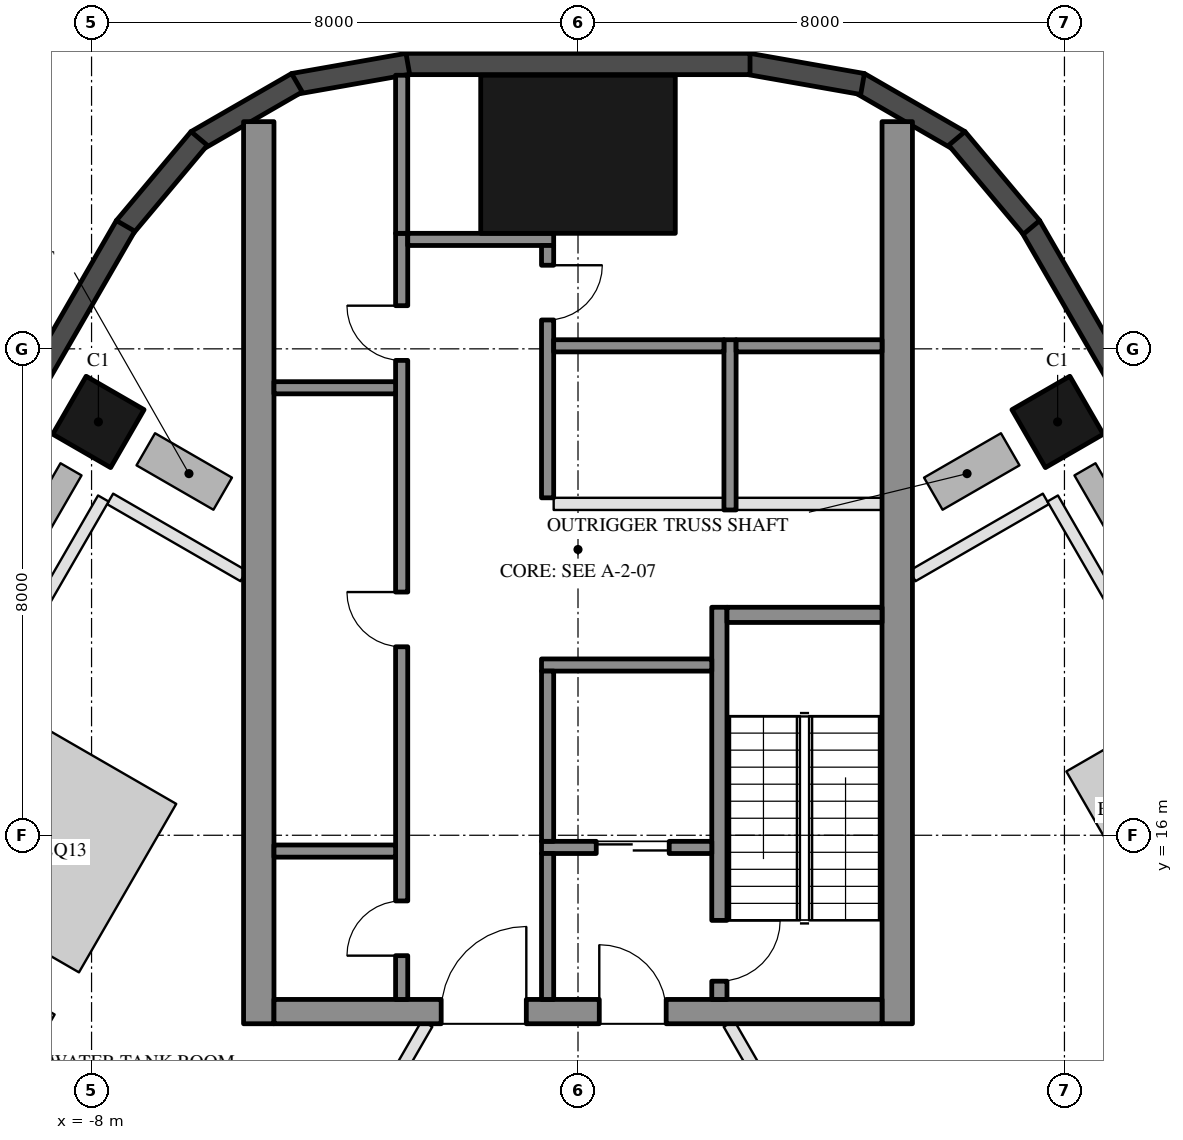
"""IFC4 building model, lengths in metres.
Left out: names, types, materials, properties, quantities, classifications, styles, units other than length and angle.
Written with IfcOpenShell. Run it as: python <this file> out.ifc"""

import sys

from ifc_helpers import new_model, si_unit, direction, frame, frame_2d, origin, origin_2d, place, context, subcontext, project, spatial, rectangle, hollow_rectangle, extrude, boolean, halfspace, element, fill, save


model = new_model("IFC4")
c1 = context("Model", 3, precision=1e-05, world=origin(), true_north=direction((0.0, 1.0)))
c2 = subcontext(c1, "Body", "Model", "MODEL_VIEW")
j1 = project(units=[si_unit("LENGTHUNIT", "METRE"), si_unit("PLANEANGLEUNIT", "RADIAN")], contexts=[c1])
p1 = place(None, origin())
s1 = spatial("IfcSite", under=j1, at=p1, CompositionType="ELEMENT")
p2 = place(p1, origin())
s2 = spatial("IfcBuilding", under=s1, at=p2, CompositionType="ELEMENT")
p3 = place(p2, frame((0.0, 0.0, 37.5)))
s3 = spatial("IfcBuildingStorey", under=s2, at=p3, CompositionType="ELEMENT", Elevation=37.5)
for number, where, z_axis, x_axis in (
    (1, (7.888, 22.798, 0.0), (0.0, 0.0, 1.0), (-0.5, 0.866, 0.0)),
    (2, (-7.888, 22.798, 0.0), (0.0, 0.0, 1.0), (0.5, 0.866, 0.0)),
):
    element("IfcColumn", number, at=place(p3, frame(where, z_axis=z_axis, x_axis=x_axis)), inside=s3, PredefinedType="COLUMN", context=c2, shape_type="SweptSolid", body=[
        boolean("DIFFERENCE", extrude(hollow_rectangle(XDim=1.1, YDim=1.1, WallThickness=0.05, at=origin_2d()), origin(), (0.0, 0.0, 1.0), 4.5), halfspace(frame((0.0, 0.0, 0.007), z_axis=(0.0, 0.0, 1.0), x_axis=(1.0, 0.0, 0.0)), True)),
    ])
p4 = place(p3, frame((0.0, 27.2, 0.0), z_axis=(0.0, 0.0, 1.0), x_axis=(1.0, 0.0, 0.0)))
e3 = element("IfcColumn", 3, at=p4, inside=s3, PredefinedType="COLUMN", context=c2, shape_type="SweptSolid", body=[
    extrude(hollow_rectangle(XDim=3.2, YDim=2.6, WallThickness=0.08, at=origin_2d()), origin(), (0.0, 0.0, 1.0), 4.5),
])
for number, where, z_axis, x_axis in (
    (4, (6.277, 27.422, 0.0), (0.0, 0.0, 1.0), (-0.866, 0.5, 0.0)),
    (5, (4.68, 28.356, 0.0), (0.0, 0.0, 1.0), (-0.985, 0.174, 0.0)),
):
    element("IfcWall", number, at=place(p3, frame(where, z_axis=z_axis, x_axis=x_axis)), inside=s3, PredefinedType="SOLIDWALL", context=c2, shape_type="SweptSolid", body=[
        extrude(rectangle(XDim=1.91, YDim=0.35, at=frame_2d((0.955, 0.0))), origin(), (0.0, 0.0, 1.0), 4.2),
    ])
p5 = place(p3, frame((2.829, 28.685, 0.0), z_axis=(0.0, 0.0, 1.0), x_axis=(-1.0, 0.0, 0.0)))
e6 = element("IfcWall", 6, at=p5, inside=s3, PredefinedType="SOLIDWALL", context=c2, shape_type="SweptSolid", body=[
    extrude(rectangle(XDim=5.658, YDim=0.35, at=frame_2d((2.829, 0.0))), origin(), (0.0, 0.0, 1.0), 4.2),
])
for number, where, z_axis, x_axis in (
    (7, (-2.799, 28.688, 0.0), (0.0, 0.0, 1.0), (-0.985, -0.174, 0.0)),
    (8, (-4.623, 28.377, 0.0), (0.0, 0.0, 1.0), (-0.866, -0.5, 0.0)),
):
    element("IfcWall", number, at=place(p3, frame(where, z_axis=z_axis, x_axis=x_axis)), inside=s3, PredefinedType="SOLIDWALL", context=c2, shape_type="SweptSolid", body=[
        extrude(rectangle(XDim=1.91, YDim=0.35, at=frame_2d((0.955, 0.0))), origin(), (0.0, 0.0, 1.0), 4.2),
    ])
p6 = place(p3, frame((-6.23, 27.461, 0.0), z_axis=(0.0, 0.0, 1.0), x_axis=(-0.642808304945, -0.766027077259, 0.0)))
e9 = element("IfcWall", 9, at=p6, inside=s3, PredefinedType="SOLIDWALL", context=c2, shape_type="SweptSolid", body=[
    extrude(rectangle(XDim=1.91, YDim=0.35, at=frame_2d((0.955, 0.0))), origin(), (0.0, 0.0, 1.0), 4.2),
])
for number, where, z_axis, x_axis in (
    (10, (-7.441, 26.022, 0.0), (0.0, 0.0, 1.0), (-0.5, -0.866, 0.0)),
    (11, (26.256, -6.567, 0.0), (0.0, 0.0, 1.0), (-0.5, 0.866, 0.0)),
):
    element("IfcWall", number, at=place(p3, frame(where, z_axis=z_axis, x_axis=x_axis)), inside=s3, PredefinedType="SOLIDWALL", context=c2, shape_type="SweptSolid", body=[
        extrude(rectangle(XDim=37.631, YDim=0.35, at=frame_2d((18.816, 0.0))), origin(), (0.0, 0.0, 1.0), 4.2),
    ])
p7 = place(p3, frame((7.458, 25.998, 0.0), z_axis=(0.0, 0.0, 1.0), x_axis=(-0.642808304945, 0.766027077259, 0.0)))
e12 = element("IfcWall", 12, at=p7, inside=s3, PredefinedType="SOLIDWALL", context=c2, shape_type="SweptSolid", body=[
    extrude(rectangle(XDim=1.91, YDim=0.35, at=frame_2d((0.955, 0.0))), origin(), (0.0, 0.0, 1.0), 4.2),
])
for number, where, z_axis, x_axis in (
    (13, (5.25, 12.9, 0.0), (0.0, 0.0, 1.0), (0.0, 1.0, 0.0)),
    (14, (-5.25, 12.9, 0.0), (0.0, 0.0, 1.0), (0.0, 1.0, 0.0)),
):
    element("IfcWall", number, at=place(p3, frame(where, z_axis=z_axis, x_axis=x_axis)), inside=s3, PredefinedType="SHEAR", context=c2, shape_type="SweptSolid", body=[
        extrude(rectangle(XDim=14.837, YDim=0.5, at=frame_2d((7.418, 0.0))), origin(), (0.0, 0.0, 1.0), 4.2),
    ])
p8 = place(p3, frame((5.0, 13.1, 0.0), z_axis=(0.0, 0.0, 1.0), x_axis=(-1.0, 0.0, 0.0)))
e15 = element("IfcWall", 15, at=p8, inside=s3, PredefinedType="SHEAR", context=c2, shape_type="SweptSolid", body=[
    extrude(rectangle(XDim=10.0, YDim=0.4, at=frame_2d((5.0, 0.0))), origin(), (0.0, 0.0, 1.0), 4.2),
])
p9 = place(p8, frame((3.55, 0.0, 0.0)))
e16 = element("IfcOpeningElement", 16, at=p9, cuts=e15, PredefinedType="OPENING", context=c2, shape_type="SweptSolid", body=[
    extrude(rectangle(XDim=1.1, YDim=2.1, at=frame_2d((0.55, 1.05))), frame((0.0, 0.21, 0.0), z_axis=(0.0, -1.0, 0.0), x_axis=(1.0, 0.0, 0.0)), (0.0, 0.0, 1.0), 0.42),
])
p10 = place(p8, frame((5.85, 0.0, 0.0)))
e17 = element("IfcOpeningElement", 17, at=p10, cuts=e15, PredefinedType="OPENING", context=c2, shape_type="SweptSolid", body=[
    extrude(rectangle(XDim=1.4, YDim=2.1, at=frame_2d((0.7, 1.05))), frame((0.0, 0.21, 0.0), z_axis=(0.0, -1.0, 0.0), x_axis=(1.0, 0.0, 0.0)), (0.0, 0.0, 1.0), 0.42),
])
p11 = place(p3, frame((2.325, 13.3, 0.0), z_axis=(0.0, 0.0, 1.0), x_axis=(0.0, 1.0, 0.0)))
e18 = element("IfcWall", 18, at=p11, inside=s3, PredefinedType="SHEAR", context=c2, shape_type="SweptSolid", body=[
    extrude(rectangle(XDim=6.45, YDim=0.25, at=frame_2d((3.225, 0.0))), origin(), (0.0, 0.0, 1.0), 4.2),
])
p12 = place(p11, frame((0.3, 0.0, 0.0)))
e19 = element("IfcOpeningElement", 19, at=p12, cuts=e18, PredefinedType="OPENING", context=c2, shape_type="SweptSolid", body=[
    extrude(rectangle(XDim=1.0, YDim=2.1, at=frame_2d((0.5, 1.05))), frame((0.0, 0.135, 0.0), z_axis=(0.0, -1.0, 0.0), x_axis=(1.0, 0.0, 0.0)), (0.0, 0.0, 1.0), 0.27),
])
p13 = place(p3, frame((5.0, 19.625, 0.0), z_axis=(0.0, 0.0, 1.0), x_axis=(-1.0, 0.0, 0.0)))
e20 = element("IfcWall", 20, at=p13, inside=s3, PredefinedType="SHEAR", context=c2, shape_type="SweptSolid", body=[
    extrude(rectangle(XDim=2.55, YDim=0.25, at=frame_2d((1.275, 0.0))), origin(), (0.0, 0.0, 1.0), 4.2),
])
p14 = place(p3, frame((2.2, 18.8, 0.0), z_axis=(0.0, 0.0, 1.0), x_axis=(-1.0, 0.0, 0.0)))
e21 = element("IfcWall", 21, at=p14, inside=s3, PredefinedType="SHEAR", context=c2, shape_type="SweptSolid", body=[
    extrude(rectangle(XDim=2.8, YDim=0.2, at=frame_2d((1.4, 0.0))), origin(), (0.0, 0.0, 1.0), 4.2),
])
p15 = place(p3, frame((2.2, 15.8, 0.0), z_axis=(0.0, 0.0, 1.0), x_axis=(-1.0, 0.0, 0.0)))
e22 = element("IfcWall", 22, at=p15, inside=s3, PredefinedType="SHEAR", context=c2, shape_type="SweptSolid", body=[
    extrude(rectangle(XDim=2.8, YDim=0.2, at=frame_2d((1.4, 0.0))), origin(), (0.0, 0.0, 1.0), 4.2),
])
p16 = place(p15, frame((0.7, 0.0, 0.0)))
e23 = element("IfcOpeningElement", 23, at=p16, cuts=e22, PredefinedType="OPENING", context=c2, shape_type="SweptSolid", body=[
    extrude(rectangle(XDim=1.2, YDim=2.1, at=frame_2d((0.6, 1.05))), frame((0.0, 0.11, 0.0), z_axis=(0.0, -1.0, 0.0), x_axis=(1.0, 0.0, 0.0)), (0.0, 0.0, 1.0), 0.22),
])
p17 = place(p3, frame((-0.5, 15.9, 0.0), z_axis=(0.0, 0.0, 1.0), x_axis=(0.0, 1.0, 0.0)))
e24 = element("IfcWall", 24, at=p17, inside=s3, PredefinedType="SHEAR", context=c2, shape_type="SweptSolid", body=[
    extrude(rectangle(XDim=2.8, YDim=0.2, at=frame_2d((1.4, 0.0))), origin(), (0.0, 0.0, 1.0), 4.2),
])
p18 = place(p3, frame((-0.5, 13.3, 0.0), z_axis=(0.0, 0.0, 1.0), x_axis=(0.0, 1.0, 0.0)))
e25 = element("IfcWall", 25, at=p18, inside=s3, PredefinedType="SHEAR", context=c2, shape_type="SweptSolid", body=[
    extrude(rectangle(XDim=2.4, YDim=0.2, at=frame_2d((1.2, 0.0))), origin(), (0.0, 0.0, 1.0), 4.2),
])
p19 = place(p3, frame((-2.9, 13.3, 0.0), z_axis=(0.0, 0.0, 1.0), x_axis=(0.0, 1.0, 0.0)))
e26 = element("IfcWall", 26, at=p19, inside=s3, PredefinedType="SHEAR", context=c2, shape_type="SweptSolid", body=[
    extrude(rectangle(XDim=12.6, YDim=0.2, at=frame_2d((6.3, 0.0))), origin(), (0.0, 0.0, 1.0), 4.2),
])
p20 = place(p19, frame((0.72, 0.0, 0.0)))
e27 = element("IfcOpeningElement", 27, at=p20, cuts=e26, PredefinedType="OPENING", context=c2, shape_type="SweptSolid", body=[
    extrude(rectangle(XDim=0.9, YDim=2.1, at=frame_2d((0.45, 1.05))), frame((0.0, 0.11, 0.0), z_axis=(0.0, -1.0, 0.0), x_axis=(1.0, 0.0, 0.0)), (0.0, 0.0, 1.0), 0.22),
])
p21 = place(p19, frame((5.8, 0.0, 0.0)))
e28 = element("IfcOpeningElement", 28, at=p21, cuts=e26, PredefinedType="OPENING", context=c2, shape_type="SweptSolid", body=[
    extrude(rectangle(XDim=0.9, YDim=2.1, at=frame_2d((0.45, 1.05))), frame((0.0, 0.11, 0.0), z_axis=(0.0, -1.0, 0.0), x_axis=(1.0, 0.0, 0.0)), (0.0, 0.0, 1.0), 0.22),
])
p22 = place(p19, frame((10.51, 0.0, 0.0)))
e29 = element("IfcOpeningElement", 29, at=p22, cuts=e26, PredefinedType="OPENING", context=c2, shape_type="SweptSolid", body=[
    extrude(rectangle(XDim=0.9, YDim=2.1, at=frame_2d((0.45, 1.05))), frame((0.0, 0.11, 0.0), z_axis=(0.0, -1.0, 0.0), x_axis=(1.0, 0.0, 0.0)), (0.0, 0.0, 1.0), 0.22),
])
p23 = place(p3, frame((-0.4, 25.8, 0.0), z_axis=(0.0, 0.0, 1.0), x_axis=(-1.0, 0.0, 0.0)))
e30 = element("IfcWall", 30, at=p23, inside=s3, PredefinedType="SHEAR", context=c2, shape_type="SweptSolid", body=[
    extrude(rectangle(XDim=2.4, YDim=0.2, at=frame_2d((1.2, 0.0))), origin(), (0.0, 0.0, 1.0), 4.2),
])
p24 = place(p3, frame((-0.5, 21.55, 0.0), z_axis=(0.0, 0.0, 1.0), x_axis=(0.0, 1.0, 0.0)))
e31 = element("IfcWall", 31, at=p24, inside=s3, PredefinedType="SHEAR", context=c2, shape_type="SweptSolid", body=[
    extrude(rectangle(XDim=4.15, YDim=0.2, at=frame_2d((2.075, 0.0))), origin(), (0.0, 0.0, 1.0), 4.2),
])
p25 = place(p24, frame((2.925, 0.0, 0.0)))
e32 = element("IfcOpeningElement", 32, at=p25, cuts=e31, PredefinedType="OPENING", context=c2, shape_type="SweptSolid", body=[
    extrude(rectangle(XDim=0.9, YDim=2.1, at=frame_2d((0.45, 1.05))), frame((0.0, 0.11, 0.0), z_axis=(0.0, -1.0, 0.0), x_axis=(1.0, 0.0, 0.0)), (0.0, 0.0, 1.0), 0.22),
])
for number, where, z_axis, x_axis in (
    (33, (-3.0, 15.74, 0.0), (0.0, 0.0, 1.0), (-1.0, 0.0, 0.0)),
    (34, (-3.0, 23.36, 0.0), (0.0, 0.0, 1.0), (-1.0, 0.0, 0.0)),
):
    element("IfcWall", number, at=place(p3, frame(where, z_axis=z_axis, x_axis=x_axis)), inside=s3, PredefinedType="SHEAR", context=c2, shape_type="SweptSolid", body=[
        extrude(rectangle(XDim=2.0, YDim=0.2, at=frame_2d((1.0, 0.0))), origin(), (0.0, 0.0, 1.0), 4.2),
    ])
p26 = place(p3, frame((-2.9, 25.9, 0.0), z_axis=(0.0, 0.0, 1.0), x_axis=(0.0, 1.0, 0.0)))
e35 = element("IfcWall", 35, at=p26, inside=s3, PredefinedType="SHEAR", context=c2, shape_type="SweptSolid", body=[
    extrude(rectangle(XDim=2.6, YDim=0.2, at=frame_2d((1.3, 0.0))), origin(), (0.0, 0.0, 1.0), 4.2),
])
p27 = place(p3, frame((2.5, 21.35, 0.0), z_axis=(0.0, 0.0, 1.0), x_axis=(0.0, 1.0, 0.0)))
e36 = element("IfcWall", 36, at=p27, inside=s3, PredefinedType="SHEAR", context=c2, shape_type="SweptSolid", body=[
    extrude(rectangle(XDim=2.8, YDim=0.2, at=frame_2d((1.4, 0.0))), origin(), (0.0, 0.0, 1.0), 4.2),
])
p28 = place(p3, frame((5.0, 24.05, 0.0), z_axis=(0.0, 0.0, 1.0), x_axis=(-1.0, 0.0, 0.0)))
e37 = element("IfcWall", 37, at=p28, inside=s3, PredefinedType="SHEAR", context=c2, shape_type="SweptSolid", body=[
    extrude(rectangle(XDim=2.4, YDim=0.2, at=frame_2d((1.2, 0.0))), origin(), (0.0, 0.0, 1.0), 4.2),
])
p29 = place(p3, frame((2.4, 24.05, 0.0), z_axis=(0.0, 0.0, 1.0), x_axis=(-1.0, 0.0, 0.0)))
e38 = element("IfcWall", 38, at=p29, inside=s3, PredefinedType="SHEAR", context=c2, shape_type="SweptSolid", body=[
    extrude(rectangle(XDim=2.8, YDim=0.2, at=frame_2d((1.4, 0.0))), origin(), (0.0, 0.0, 1.0), 4.2),
])
p30 = place(p3, frame((5.0, 21.45, 0.0), z_axis=(0.0, 0.0, 1.0), x_axis=(-1.0, 0.0, 0.0)))
e39 = element("IfcWall", 39, at=p30, inside=s3, PredefinedType="PARTITIONING", context=c2, shape_type="SweptSolid", body=[
    extrude(rectangle(XDim=2.4, YDim=0.2, at=frame_2d((1.2, 0.0))), origin(), (0.0, 0.0, 1.0), 4.2),
])
p31 = place(p3, frame((2.4, 21.45, 0.0), z_axis=(0.0, 0.0, 1.0), x_axis=(-1.0, 0.0, 0.0)))
e40 = element("IfcWall", 40, at=p31, inside=s3, PredefinedType="PARTITIONING", context=c2, shape_type="SweptSolid", body=[
    extrude(rectangle(XDim=2.8, YDim=0.2, at=frame_2d((1.4, 0.0))), origin(), (0.0, 0.0, 1.0), 4.2),
])
p32 = place(p3, frame((7.695, 21.532, 0.0), z_axis=(0.0, 0.0, 1.0), x_axis=(-0.865999496279, -0.500044870432, 0.0)))
e41 = element("IfcWall", 41, at=p32, inside=s3, PredefinedType="PARTITIONING", context=c2, shape_type="SweptSolid", body=[
    extrude(rectangle(XDim=2.534, YDim=0.2, at=frame_2d((1.267, 0.0))), origin(), (0.0, 0.0, 1.0), 4.2),
])
p33 = place(p3, frame((22.556, -4.009, 0.0), z_axis=(0.0, 0.0, 1.0), x_axis=(-0.500002084189, 0.866024200474, 0.0)))
e42 = element("IfcWall", 42, at=p33, inside=s3, PredefinedType="PARTITIONING", context=c2, shape_type="SweptSolid", body=[
    extrude(rectangle(XDim=29.5, YDim=0.2, at=frame_2d((14.75, 0.0))), origin(), (0.0, 0.0, 1.0), 3.41),
])
p34 = place(p3, frame((12.413, -4.3, 0.0), z_axis=(0.0, 0.0, 1.0), x_axis=(-0.50000478328, 0.866022642139, 0.0)))
e43 = element("IfcWall", 43, at=p34, inside=s3, PredefinedType="PARTITIONING", context=c2, shape_type="SweptSolid", body=[
    extrude(rectangle(XDim=19.861, YDim=0.2, at=frame_2d((9.931, 0.0))), origin(), (0.0, 0.0, 1.0), 3.41),
])
p35 = place(p34, frame((2.371, 0.0, 0.0)))
e44 = element("IfcOpeningElement", 44, at=p35, cuts=e43, PredefinedType="OPENING", context=c2, shape_type="SweptSolid", body=[
    extrude(rectangle(XDim=1.2, YDim=2.1, at=frame_2d((0.6, 1.05))), frame((0.0, 0.11, 0.0), z_axis=(0.0, -1.0, 0.0), x_axis=(1.0, 0.0, 0.0)), (0.0, 0.0, 1.0), 0.22),
])
p36 = place(p34, frame((8.331, 0.0, 0.0)))
e45 = element("IfcOpeningElement", 45, at=p36, cuts=e43, PredefinedType="OPENING", context=c2, shape_type="SweptSolid", body=[
    extrude(rectangle(XDim=1.2, YDim=2.1, at=frame_2d((0.6, 1.05))), frame((0.0, 0.11, 0.0), z_axis=(0.0, -1.0, 0.0), x_axis=(1.0, 0.0, 0.0)), (0.0, 0.0, 1.0), 0.22),
])
p37 = place(p34, frame((15.29, 0.0, 0.0)))
e46 = element("IfcOpeningElement", 46, at=p37, cuts=e43, PredefinedType="OPENING", context=c2, shape_type="SweptSolid", body=[
    extrude(rectangle(XDim=1.2, YDim=2.1, at=frame_2d((0.6, 1.05))), frame((0.0, 0.11, 0.0), z_axis=(0.0, -1.0, 0.0), x_axis=(1.0, 0.0, 0.0)), (0.0, 0.0, 1.0), 0.22),
])
p38 = place(p3, frame((-7.695, 21.532, 0.0), z_axis=(0.0, 0.0, 1.0), x_axis=(0.865999496279, -0.500044870432, 0.0)))
e47 = element("IfcWall", 47, at=p38, inside=s3, PredefinedType="PARTITIONING", context=c2, shape_type="SweptSolid", body=[
    extrude(rectangle(XDim=2.534, YDim=0.2, at=frame_2d((1.267, 0.0))), origin(), (0.0, 0.0, 1.0), 4.2),
])
p39 = place(p3, frame((-7.806, 21.539, 0.0), z_axis=(0.0, 0.0, 1.0), x_axis=(-0.500002084189, -0.866024200474, 0.0)))
e48 = element("IfcWall", 48, at=p39, inside=s3, PredefinedType="PARTITIONING", context=c2, shape_type="SweptSolid", body=[
    extrude(rectangle(XDim=29.5, YDim=0.2, at=frame_2d((14.75, 0.0))), origin(), (0.0, 0.0, 1.0), 3.41),
])
p40 = place(p3, frame((-2.482, 12.9, 0.0), z_axis=(0.0, 0.0, 1.0), x_axis=(-0.50000478328, -0.866022642139, 0.0)))
e49 = element("IfcWall", 49, at=p40, inside=s3, PredefinedType="PARTITIONING", context=c2, shape_type="SweptSolid", body=[
    extrude(rectangle(XDim=19.861, YDim=0.2, at=frame_2d((9.931, 0.0))), origin(), (0.0, 0.0, 1.0), 3.41),
])
p41 = place(p40, frame((3.121, 0.0, 0.0)))
e50 = element("IfcOpeningElement", 50, at=p41, cuts=e49, PredefinedType="OPENING", context=c2, shape_type="SweptSolid", body=[
    extrude(rectangle(XDim=1.2, YDim=2.1, at=frame_2d((0.6, 1.05))), frame((0.0, 0.11, 0.0), z_axis=(0.0, -1.0, 0.0), x_axis=(1.0, 0.0, 0.0)), (0.0, 0.0, 1.0), 0.22),
])
p42 = place(p40, frame((9.581, 0.0, 0.0)))
e51 = element("IfcOpeningElement", 51, at=p42, cuts=e49, PredefinedType="OPENING", context=c2, shape_type="SweptSolid", body=[
    extrude(rectangle(XDim=1.2, YDim=2.1, at=frame_2d((0.6, 1.05))), frame((0.0, 0.11, 0.0), z_axis=(0.0, -1.0, 0.0), x_axis=(1.0, 0.0, 0.0)), (0.0, 0.0, 1.0), 0.22),
])
p43 = place(p40, frame((15.79, 0.0, 0.0)))
e52 = element("IfcOpeningElement", 52, at=p43, cuts=e49, PredefinedType="OPENING", context=c2, shape_type="SweptSolid", body=[
    extrude(rectangle(XDim=1.2, YDim=2.1, at=frame_2d((0.6, 1.05))), frame((0.0, 0.11, 0.0), z_axis=(0.0, -1.0, 0.0), x_axis=(1.0, 0.0, 0.0)), (0.0, 0.0, 1.0), 0.22),
])
p44 = place(p16, origin())
e53 = element("IfcDoor", 53, at=p44, inside=s3, OperationType="DOUBLE_DOOR_SLIDING", PredefinedType="DOOR", context=c2, shape_type="SweptSolid", body=[
    extrude(rectangle(XDim=1.2, YDim=2.1, at=frame_2d((0.6, 1.05))), frame((0.0, 0.025, 0.0), z_axis=(0.0, -1.0, 0.0), x_axis=(1.0, 0.0, 0.0)), (0.0, 0.0, 1.0), 0.05),
])
fill(e23, e53)
p45 = place(p20, origin())
e54 = element("IfcDoor", 54, at=p45, inside=s3, OperationType="SINGLE_SWING_LEFT", PredefinedType="DOOR", context=c2, shape_type="SweptSolid", body=[
    extrude(rectangle(XDim=0.9, YDim=2.1, at=frame_2d((0.45, 1.05))), frame((0.0, 0.025, 0.0), z_axis=(0.0, -1.0, 0.0), x_axis=(1.0, 0.0, 0.0)), (0.0, 0.0, 1.0), 0.05),
])
fill(e27, e54)
p46 = place(p21, origin())
e55 = element("IfcDoor", 55, at=p46, inside=s3, OperationType="SINGLE_SWING_RIGHT", PredefinedType="DOOR", context=c2, shape_type="SweptSolid", body=[
    extrude(rectangle(XDim=0.9, YDim=2.1, at=frame_2d((0.45, 1.05))), frame((0.0, 0.025, 0.0), z_axis=(0.0, -1.0, 0.0), x_axis=(1.0, 0.0, 0.0)), (0.0, 0.0, 1.0), 0.05),
])
fill(e28, e55)
p47 = place(p22, origin())
e56 = element("IfcDoor", 56, at=p47, inside=s3, OperationType="SINGLE_SWING_RIGHT", PredefinedType="DOOR", context=c2, shape_type="SweptSolid", body=[
    extrude(rectangle(XDim=0.9, YDim=2.1, at=frame_2d((0.45, 1.05))), frame((0.0, 0.025, 0.0), z_axis=(0.0, -1.0, 0.0), x_axis=(1.0, 0.0, 0.0)), (0.0, 0.0, 1.0), 0.05),
])
fill(e29, e56)
p48 = place(p25, frame((0.9, 0.0, 0.0), z_axis=(0.0, 0.0, 1.0), x_axis=(-1.0, 0.0, 0.0)))
e57 = element("IfcDoor", 57, at=p48, inside=s3, OperationType="SINGLE_SWING_LEFT", PredefinedType="DOOR", context=c2, shape_type="SweptSolid", body=[
    extrude(rectangle(XDim=0.9, YDim=2.1, at=frame_2d((0.45, 1.05))), frame((0.0, 0.025, 0.0), z_axis=(0.0, -1.0, 0.0), x_axis=(1.0, 0.0, 0.0)), (0.0, 0.0, 1.0), 0.05),
])
fill(e32, e57)
p49 = place(p9, frame((1.1, 0.0, 0.0), z_axis=(0.0, 0.0, 1.0), x_axis=(-1.0, 0.0, 0.0)))
e58 = element("IfcDoor", 58, at=p49, inside=s3, OperationType="SINGLE_SWING_LEFT", PredefinedType="DOOR", context=c2, shape_type="SweptSolid", body=[
    extrude(rectangle(XDim=1.1, YDim=2.1, at=frame_2d((0.55, 1.05))), frame((0.0, 0.025, 0.0), z_axis=(0.0, -1.0, 0.0), x_axis=(1.0, 0.0, 0.0)), (0.0, 0.0, 1.0), 0.05),
])
fill(e16, e58)
p50 = place(p10, frame((1.4, 0.0, 0.0), z_axis=(0.0, 0.0, 1.0), x_axis=(-1.0, 0.0, 0.0)))
e59 = element("IfcDoor", 59, at=p50, inside=s3, OperationType="DOUBLE_DOOR_SINGLE_SWING", PredefinedType="DOOR", context=c2, shape_type="SweptSolid", body=[
    extrude(rectangle(XDim=1.4, YDim=2.1, at=frame_2d((0.7, 1.05))), frame((0.0, 0.025, 0.0), z_axis=(0.0, -1.0, 0.0), x_axis=(1.0, 0.0, 0.0)), (0.0, 0.0, 1.0), 0.05),
])
fill(e17, e59)
p51 = place(p12, frame((1.0, 0.0, 0.0), z_axis=(0.0, 0.0, 1.0), x_axis=(-1.0, 0.0, 0.0)))
e60 = element("IfcDoor", 60, at=p51, inside=s3, OperationType="SINGLE_SWING_LEFT", PredefinedType="DOOR", context=c2, shape_type="SweptSolid", body=[
    extrude(rectangle(XDim=1.0, YDim=2.1, at=frame_2d((0.5, 1.05))), frame((0.0, 0.025, 0.0), z_axis=(0.0, -1.0, 0.0), x_axis=(1.0, 0.0, 0.0)), (0.0, 0.0, 1.0), 0.05),
])
fill(e19, e60)
save(model, sys.argv[1])
